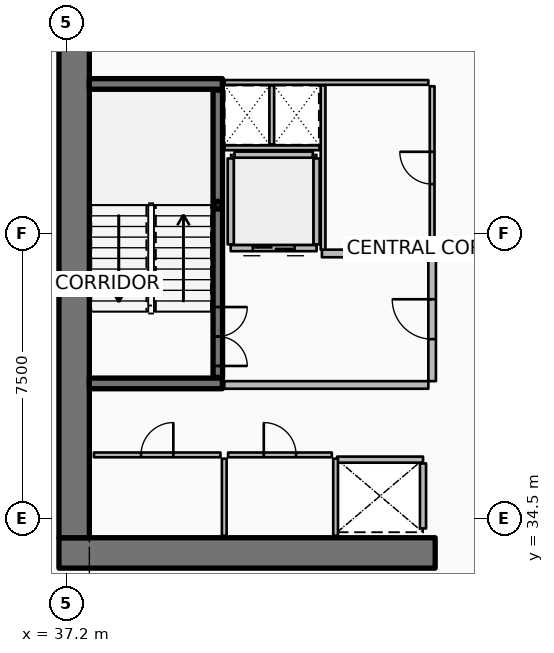
"""IFC4 building model, lengths in metres.
Left out: names, types, materials, properties, quantities, classifications, styles, units other than length and angle.
Written with IfcOpenShell. Run it as: python <this file> out.ifc"""

import sys

from ifc_helpers import new_model, si_unit, direction, frame, frame_2d, origin, origin_2d, place, context, subcontext, project, spatial, rectangle, hollow_rectangle, extrude, element, fill, save


model = new_model("IFC4")
c1 = context("Model", 3, precision=1e-05, world=origin(), true_north=direction((0.0, 1.0)))
c2 = subcontext(c1, "Body", "Model", "MODEL_VIEW")
j1 = project(units=[si_unit("LENGTHUNIT", "METRE"), si_unit("PLANEANGLEUNIT", "RADIAN")], contexts=[c1])
p1 = place(None, origin())
s1 = spatial("IfcSite", under=j1, at=p1, CompositionType="ELEMENT")
p2 = place(p1, origin())
s2 = spatial("IfcBuilding", under=s1, at=p2, CompositionType="ELEMENT")
p3 = place(p2, frame((0.0, 0.0, 150.3)))
s3 = spatial("IfcBuildingStorey", under=s2, at=p3, CompositionType="ELEMENT", Elevation=150.3)
p4 = place(p3, frame((37.0, 33.6, 0.0), z_axis=(0.0, 0.0, 1.0), x_axis=(1.0, 0.0, 0.0)))
e1 = element("IfcWall", 1, at=p4, inside=s3, PredefinedType="SHEAR", context=c2, shape_type="SweptSolid", body=[
    extrude(rectangle(XDim=9.9, YDim=0.8, at=frame_2d((4.95, 0.0))), origin(), (0.0, 0.0, 1.0), 3.75),
])
p5 = place(p3, frame((37.4, 34.0, 0.0), z_axis=(0.0, 0.0, 1.0), x_axis=(0.0, 1.0, 0.0)))
e2 = element("IfcWall", 2, at=p5, inside=s3, PredefinedType="SHEAR", context=c2, shape_type="SweptSolid", body=[
    extrude(rectangle(XDim=16.0, YDim=0.8, at=frame_2d((8.0, 0.0))), origin(), (0.0, 0.0, 1.0), 3.75),
])
for number, where, z_axis, x_axis in (
    (3, (37.8, 38.06, 0.0), (0.0, 0.0, 1.0), (1.0, 0.0, 0.0)),
    (4, (37.8, 45.94, 0.0), (0.0, 0.0, 1.0), (1.0, 0.0, 0.0)),
):
    element("IfcWall", number, at=place(p3, frame(where, z_axis=z_axis, x_axis=x_axis)), inside=s3, PredefinedType="SHEAR", context=c2, shape_type="SweptSolid", body=[
        extrude(rectangle(XDim=3.5, YDim=0.28, at=frame_2d((1.75, 0.0))), origin(), (0.0, 0.0, 1.0), 3.75),
    ])
p6 = place(p3, frame((41.18, 42.75, 0.0), z_axis=(0.0, 0.0, 1.0), x_axis=(1.0, 0.0, 0.0)))
e5 = element("IfcColumn", 5, at=p6, inside=s3, PredefinedType="COLUMN", context=c2, shape_type="SweptSolid", body=[
    extrude(hollow_rectangle(XDim=0.2, YDim=0.2, WallThickness=0.01, InnerFilletRadius=0.01, OuterFilletRadius=0.02, at=origin_2d()), origin(), (0.0, 0.0, 1.0), 1.67),
])
p7 = place(p3, frame((41.18, 38.22, 0.0), z_axis=(0.0, 0.0, 1.0), x_axis=(0.0, 1.0, 0.0)))
e6 = element("IfcWall", 6, at=p7, inside=s3, PredefinedType="SOLIDWALL", context=c2, shape_type="SweptSolid", body=[
    extrude(rectangle(XDim=7.56, YDim=0.25, at=frame_2d((3.78, 0.0))), origin(), (0.0, 0.0, 1.0), 3.5),
])
p8 = place(p7, frame((0.3, 0.0, 0.0)))
e7 = element("IfcOpeningElement", 7, at=p8, cuts=e6, PredefinedType="OPENING", context=c2, shape_type="SweptSolid", body=[
    extrude(rectangle(XDim=1.55, YDim=2.15, at=frame_2d((0.775, 1.075))), frame((0.0, 0.135, 0.0), z_axis=(0.0, -1.0, 0.0), x_axis=(1.0, 0.0, 0.0)), (0.0, 0.0, 1.0), 0.27),
])
p9 = place(p3, frame((44.32, 36.055, 0.0), z_axis=(0.0, 0.0, 1.0), x_axis=(1.0, 0.0, 0.0)))
e8 = element("IfcWall", 8, at=p9, inside=s3, PredefinedType="PARTITIONING", context=c2, shape_type="SweptSolid", body=[
    extrude(rectangle(XDim=2.26, YDim=0.16, at=frame_2d((1.13, 0.0))), origin(), (0.0, 0.0, 1.0), 3.5),
])
p10 = place(p3, frame((46.58, 34.245, 0.0), z_axis=(0.0, 0.0, 1.0), x_axis=(0.0, 1.0, 0.0)))
e9 = element("IfcWall", 9, at=p10, inside=s3, PredefinedType="PARTITIONING", context=c2, shape_type="SweptSolid", body=[
    extrude(rectangle(XDim=1.71, YDim=0.16, at=frame_2d((0.855, 0.0))), origin(), (0.0, 0.0, 1.0), 3.5),
])
p11 = place(p3, frame((43.78, 41.62, 0.0), z_axis=(0.0, 0.0, 1.0), x_axis=(-1.0, 0.0, 0.0)))
e10 = element("IfcWall", 10, at=p11, inside=s3, PredefinedType="PARTITIONING", context=c2, shape_type="SweptSolid", body=[
    extrude(rectangle(XDim=2.26, YDim=0.16, at=frame_2d((1.13, 0.0))), origin(), (0.0, 0.0, 1.0), 3.5),
])
p12 = place(p11, frame((0.58, 0.0, 0.0)))
e11 = element("IfcOpeningElement", 11, at=p12, cuts=e10, PredefinedType="OPENING", context=c2, shape_type="SweptSolid", body=[
    extrude(rectangle(XDim=1.1, YDim=2.1, at=frame_2d((0.55, 1.05))), frame((0.0, 0.09, 0.0), z_axis=(0.0, -1.0, 0.0), x_axis=(1.0, 0.0, 0.0)), (0.0, 0.0, 1.0), 0.18),
])
for number, where, z_axis, x_axis in (
    (12, (43.78, 41.72, 0.0), (0.0, 0.0, 1.0), (0.0, 1.0, 0.0)),
    (13, (41.52, 41.72, 0.0), (0.0, 0.0, 1.0), (0.0, 1.0, 0.0)),
):
    element("IfcWall", number, at=place(p3, frame(where, z_axis=z_axis, x_axis=x_axis)), inside=s3, PredefinedType="PARTITIONING", context=c2, shape_type="SweptSolid", body=[
        extrude(rectangle(XDim=2.26, YDim=0.16, at=frame_2d((1.13, 0.0))), origin(), (0.0, 0.0, 1.0), 3.5),
    ])
p13 = place(p3, frame((41.62, 44.08, 0.0), z_axis=(0.0, 0.0, 1.0), x_axis=(1.0, 0.0, 0.0)))
e14 = element("IfcWall", 14, at=p13, inside=s3, PredefinedType="PARTITIONING", context=c2, shape_type="SweptSolid", body=[
    extrude(rectangle(XDim=2.06, YDim=0.16, at=frame_2d((1.03, 0.0))), origin(), (0.0, 0.0, 1.0), 3.5),
])
for number, where, z_axis, x_axis in (
    (15, (44.28, 34.05, 0.0), (0.0, 0.0, 1.0), (0.0, 1.0, 0.0)),
    (16, (41.35, 34.05, 0.0), (0.0, 0.0, 1.0), (0.0, 1.0, 0.0)),
):
    element("IfcWall", number, at=place(p3, frame(where, z_axis=z_axis, x_axis=x_axis)), inside=s3, PredefinedType="PARTITIONING", context=c2, shape_type="SweptSolid", body=[
        extrude(rectangle(XDim=2.03, YDim=0.125, at=frame_2d((1.015, 0.0))), origin(), (0.0, 0.0, 1.0), 2.94),
    ])
p14 = place(p3, frame((37.92, 36.18, 0.0), z_axis=(0.0, 0.0, 1.0), x_axis=(1.0, 0.0, 0.0)))
e17 = element("IfcWall", 17, at=p14, inside=s3, PredefinedType="PARTITIONING", context=c2, shape_type="SweptSolid", body=[
    extrude(rectangle(XDim=3.33, YDim=0.125, at=frame_2d((1.665, 0.0))), origin(), (0.0, 0.0, 1.0), 2.94),
])
p15 = place(p14, frame((1.24, 0.0, 0.0)))
e18 = element("IfcOpeningElement", 18, at=p15, cuts=e17, PredefinedType="OPENING", context=c2, shape_type="SweptSolid", body=[
    extrude(rectangle(XDim=0.85, YDim=2.06, at=frame_2d((0.425, 1.03))), frame((0.0, 0.073, 0.0), z_axis=(0.0, -1.0, 0.0), x_axis=(1.0, 0.0, 0.0)), (0.0, 0.0, 1.0), 0.145),
])
p16 = place(p3, frame((41.45, 36.18, 0.0), z_axis=(0.0, 0.0, 1.0), x_axis=(1.0, 0.0, 0.0)))
e19 = element("IfcWall", 19, at=p16, inside=s3, PredefinedType="PARTITIONING", context=c2, shape_type="SweptSolid", body=[
    extrude(rectangle(XDim=2.73, YDim=0.125, at=frame_2d((1.365, 0.0))), origin(), (0.0, 0.0, 1.0), 2.94),
])
p17 = place(p16, frame((0.94, 0.0, 0.0)))
e20 = element("IfcOpeningElement", 20, at=p17, cuts=e19, PredefinedType="OPENING", context=c2, shape_type="SweptSolid", body=[
    extrude(rectangle(XDim=0.85, YDim=2.06, at=frame_2d((0.425, 1.03))), frame((0.0, 0.073, 0.0), z_axis=(0.0, -1.0, 0.0), x_axis=(1.0, 0.0, 0.0)), (0.0, 0.0, 1.0), 0.145),
])
p18 = place(p3, frame((41.35, 38.02, 0.0), z_axis=(0.0, 0.0, 1.0), x_axis=(1.0, 0.0, 0.0)))
e21 = element("IfcWall", 21, at=p18, inside=s3, PredefinedType="PARTITIONING", context=c2, shape_type="SweptSolid", body=[
    extrude(rectangle(XDim=5.37, YDim=0.2, at=frame_2d((2.685, 0.0))), origin(), (0.0, 0.0, 1.0), 3.5),
])
p19 = place(p3, frame((43.92, 41.48, 0.0), z_axis=(0.0, 0.0, 1.0), x_axis=(1.0, 0.0, 0.0)))
e22 = element("IfcWall", 22, at=p19, inside=s3, PredefinedType="PARTITIONING", context=c2, shape_type="SweptSolid", body=[
    extrude(rectangle(XDim=2.8, YDim=0.2, at=frame_2d((1.4, 0.0))), origin(), (0.0, 0.0, 1.0), 3.5),
])
p20 = place(p3, frame((46.82, 38.12, 0.0), z_axis=(0.0, 0.0, 1.0), x_axis=(0.0, 1.0, 0.0)))
e23 = element("IfcWall", 23, at=p20, inside=s3, PredefinedType="PARTITIONING", context=c2, shape_type="SweptSolid", body=[
    extrude(rectangle(XDim=3.26, YDim=0.2, at=frame_2d((1.63, 0.0))), origin(), (0.0, 0.0, 1.0), 3.5),
])
p21 = place(p20, frame((1.105, 0.0, 0.0)))
e24 = element("IfcOpeningElement", 24, at=p21, cuts=e23, PredefinedType="OPENING", context=c2, shape_type="SweptSolid", body=[
    extrude(rectangle(XDim=1.05, YDim=2.1, at=frame_2d((0.525, 1.05))), frame((0.0, 0.11, 0.0), z_axis=(0.0, -1.0, 0.0), x_axis=(1.0, 0.0, 0.0)), (0.0, 0.0, 1.0), 0.22),
])
p22 = place(p3, frame((41.36, 45.98, 0.0), z_axis=(0.0, 0.0, 1.0), x_axis=(1.0, 0.0, 0.0)))
e25 = element("IfcWall", 25, at=p22, inside=s3, PredefinedType="PARTITIONING", context=c2, shape_type="SweptSolid", body=[
    extrude(rectangle(XDim=5.36, YDim=0.125, at=frame_2d((2.68, 0.0))), origin(), (0.0, 0.0, 1.0), 2.94),
])
p23 = place(p3, frame((41.36, 44.26, 0.0), z_axis=(0.0, 0.0, 1.0), x_axis=(1.0, 0.0, 0.0)))
e26 = element("IfcWall", 26, at=p23, inside=s3, PredefinedType="PARTITIONING", context=c2, shape_type="SweptSolid", body=[
    extrude(rectangle(XDim=2.5, YDim=0.125, at=frame_2d((1.25, 0.0))), origin(), (0.0, 0.0, 1.0), 2.94),
])
p24 = place(p3, frame((42.6, 44.35, 0.0), z_axis=(0.0, 0.0, 1.0), x_axis=(0.0, 1.0, 0.0)))
e27 = element("IfcWall", 27, at=p24, inside=s3, PredefinedType="PARTITIONING", context=c2, shape_type="SweptSolid", body=[
    extrude(rectangle(XDim=1.55, YDim=0.125, at=frame_2d((0.775, 0.0))), origin(), (0.0, 0.0, 1.0), 2.94),
])
p25 = place(p3, frame((43.95, 41.58, 0.0), z_axis=(0.0, 0.0, 1.0), x_axis=(0.0, 1.0, 0.0)))
e28 = element("IfcWall", 28, at=p25, inside=s3, PredefinedType="PARTITIONING", context=c2, shape_type="SweptSolid", body=[
    extrude(rectangle(XDim=4.32, YDim=0.125, at=frame_2d((2.16, 0.0))), origin(), (0.0, 0.0, 1.0), 2.94),
])
p26 = place(p3, frame((46.82, 41.58, 0.0), z_axis=(0.0, 0.0, 1.0), x_axis=(0.0, 1.0, 0.0)))
e29 = element("IfcWall", 29, at=p26, inside=s3, PredefinedType="PARTITIONING", context=c2, shape_type="SweptSolid", body=[
    extrude(rectangle(XDim=4.3, YDim=0.125, at=frame_2d((2.15, 0.0))), origin(), (0.0, 0.0, 1.0), 2.94),
])
p27 = place(p26, frame((1.725, 0.0, 0.0)))
e30 = element("IfcOpeningElement", 30, at=p27, cuts=e29, PredefinedType="OPENING", context=c2, shape_type="SweptSolid", body=[
    extrude(rectangle(XDim=0.85, YDim=2.06, at=frame_2d((0.425, 1.03))), frame((0.0, 0.073, 0.0), z_axis=(0.0, -1.0, 0.0), x_axis=(1.0, 0.0, 0.0)), (0.0, 0.0, 1.0), 0.145),
])
p28 = place(p8, origin())
e31 = element("IfcDoor", 31, at=p28, inside=s3, OperationType="DOUBLE_DOOR_SINGLE_SWING", PredefinedType="DOOR", context=c2, shape_type="SweptSolid", body=[
    extrude(rectangle(XDim=1.55, YDim=2.15, at=frame_2d((0.775, 1.075))), frame((0.0, 0.025, 0.0), z_axis=(0.0, -1.0, 0.0), x_axis=(1.0, 0.0, 0.0)), (0.0, 0.0, 1.0), 0.05),
])
fill(e7, e31)
p29 = place(p12, origin())
e32 = element("IfcDoor", 32, at=p29, inside=s3, OperationType="DOUBLE_DOOR_SLIDING", PredefinedType="DOOR", context=c2, shape_type="SweptSolid", body=[
    extrude(rectangle(XDim=1.1, YDim=2.1, at=frame_2d((0.55, 1.05))), frame((0.0, 0.025, 0.0), z_axis=(0.0, -1.0, 0.0), x_axis=(1.0, 0.0, 0.0)), (0.0, 0.0, 1.0), 0.05),
])
fill(e11, e32)
p30 = place(p15, origin())
e33 = element("IfcDoor", 33, at=p30, inside=s3, OperationType="SINGLE_SWING_RIGHT", PredefinedType="DOOR", context=c2, shape_type="SweptSolid", body=[
    extrude(rectangle(XDim=0.85, YDim=2.06, at=frame_2d((0.425, 1.03))), frame((0.0, 0.025, 0.0), z_axis=(0.0, -1.0, 0.0), x_axis=(1.0, 0.0, 0.0)), (0.0, 0.0, 1.0), 0.05),
])
fill(e18, e33)
p31 = place(p17, origin())
e34 = element("IfcDoor", 34, at=p31, inside=s3, OperationType="SINGLE_SWING_LEFT", PredefinedType="DOOR", context=c2, shape_type="SweptSolid", body=[
    extrude(rectangle(XDim=0.85, YDim=2.06, at=frame_2d((0.425, 1.03))), frame((0.0, 0.025, 0.0), z_axis=(0.0, -1.0, 0.0), x_axis=(1.0, 0.0, 0.0)), (0.0, 0.0, 1.0), 0.05),
])
fill(e20, e34)
p32 = place(p21, origin())
e35 = element("IfcDoor", 35, at=p32, inside=s3, OperationType="SINGLE_SWING_RIGHT", PredefinedType="DOOR", context=c2, shape_type="SweptSolid", body=[
    extrude(rectangle(XDim=1.05, YDim=2.1, at=frame_2d((0.525, 1.05))), frame((0.0, 0.025, 0.0), z_axis=(0.0, -1.0, 0.0), x_axis=(1.0, 0.0, 0.0)), (0.0, 0.0, 1.0), 0.05),
])
fill(e24, e35)
p33 = place(p27, origin())
e36 = element("IfcDoor", 36, at=p33, inside=s3, OperationType="SINGLE_SWING_RIGHT", PredefinedType="DOOR", context=c2, shape_type="SweptSolid", body=[
    extrude(rectangle(XDim=0.85, YDim=2.06, at=frame_2d((0.425, 1.03))), frame((0.0, 0.025, 0.0), z_axis=(0.0, -1.0, 0.0), x_axis=(1.0, 0.0, 0.0)), (0.0, 0.0, 1.0), 0.05),
])
fill(e30, e36)
save(model, sys.argv[1])
